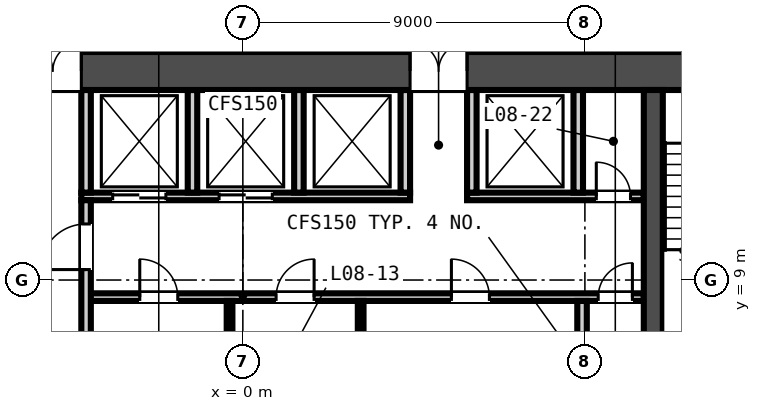
"""IFC4 building model, lengths in metres.
Left out: names, types, materials, properties, quantities, classifications, styles, units other than length and angle.
Written with IfcOpenShell. Run it as: python <this file> out.ifc"""

import sys

from ifc_helpers import new_model, si_unit, direction, frame, frame_2d, origin, place, context, subcontext, project, spatial, rectangle, extrude, element, fill, save


model = new_model("IFC4")
c1 = context("Model", 3, precision=1e-05, world=origin(), true_north=direction((0.0, 1.0)))
c2 = subcontext(c1, "Body", "Model", "MODEL_VIEW")
j1 = project(units=[si_unit("LENGTHUNIT", "METRE"), si_unit("PLANEANGLEUNIT", "RADIAN")], contexts=[c1])
p1 = place(None, origin())
s1 = spatial("IfcSite", under=j1, at=p1, CompositionType="ELEMENT")
p2 = place(p1, origin())
s2 = spatial("IfcBuilding", under=s1, at=p2, CompositionType="ELEMENT")
p3 = place(p2, frame((0.0, 0.0, 43.3)))
s3 = spatial("IfcBuildingStorey", under=s2, at=p3, CompositionType="ELEMENT", Elevation=43.3)
p4 = place(p3, frame((-15.0, 14.5, -0.15), z_axis=(0.0, 0.0, 1.0), x_axis=(1.0, 0.0, 0.0)))
e1 = element("IfcWall", 1, at=p4, inside=s3, PredefinedType="SOLIDWALL", context=c2, shape_type="SweptSolid", body=[
    extrude(rectangle(XDim=30.0, YDim=1.0, at=frame_2d((15.0, 0.0))), origin(), (0.0, 0.0, 1.0), 3.65),
])
p5 = place(p4, frame((9.25, 0.0, 0.15)))
e2 = element("IfcOpeningElement", 2, at=p5, cuts=e1, PredefinedType="OPENING", context=c2, shape_type="SweptSolid", body=[
    extrude(rectangle(XDim=1.5, YDim=2.1, at=frame_2d((0.75, 1.05))), frame((0.0, 0.51, 0.0), z_axis=(0.0, -1.0, 0.0), x_axis=(1.0, 0.0, 0.0)), (0.0, 0.0, 1.0), 1.02),
])
p6 = place(p4, frame((19.4, 0.0, 0.15)))
e3 = element("IfcOpeningElement", 3, at=p6, cuts=e1, PredefinedType="OPENING", context=c2, shape_type="SweptSolid", body=[
    extrude(rectangle(XDim=1.5, YDim=2.1, at=frame_2d((0.75, 1.05))), frame((0.0, 0.51, 0.0), z_axis=(0.0, -1.0, 0.0), x_axis=(1.0, 0.0, 0.0)), (0.0, 0.0, 1.0), 1.02),
])
p7 = place(p4, frame((1.5, 0.0, 0.15)))
e4 = element("IfcOpeningElement", 4, at=p7, cuts=e1, PredefinedType="OPENING", context=c2, shape_type="SweptSolid", body=[
    extrude(rectangle(XDim=1.2, YDim=2.1, at=frame_2d((0.6, 1.05))), frame((0.0, 0.51, 0.0), z_axis=(0.0, -1.0, 0.0), x_axis=(1.0, 0.0, 0.0)), (0.0, 0.0, 1.0), 1.02),
])
p8 = place(p4, frame((27.3, 0.0, 0.15)))
e5 = element("IfcOpeningElement", 5, at=p8, cuts=e1, PredefinedType="OPENING", context=c2, shape_type="SweptSolid", body=[
    extrude(rectangle(XDim=1.2, YDim=2.1, at=frame_2d((0.6, 1.05))), frame((0.0, 0.51, 0.0), z_axis=(0.0, -1.0, 0.0), x_axis=(1.0, 0.0, 0.0)), (0.0, 0.0, 1.0), 1.02),
])
p9 = place(p3, frame((10.8, 1.0, -0.15), z_axis=(0.0, 0.0, 1.0), x_axis=(0.0, 1.0, 0.0)))
e6 = element("IfcWall", 6, at=p9, inside=s3, PredefinedType="SOLIDWALL", context=c2, shape_type="SweptSolid", body=[
    extrude(rectangle(XDim=13.0, YDim=0.5, at=frame_2d((6.5, 0.0))), origin(), (0.0, 0.0, 1.0), 3.65),
])
p10 = place(p3, frame((-4.125, 8.55, 0.0), z_axis=(0.0, 0.0, 1.0), x_axis=(1.0, 0.0, 0.0)))
e7 = element("IfcWall", 7, at=p10, inside=s3, PredefinedType="PARTITIONING", context=c2, shape_type="SweptSolid", body=[
    extrude(rectangle(XDim=14.675, YDim=0.2, at=frame_2d((7.337, 0.0))), origin(), (0.0, 0.0, 1.0), 3.5),
])
p11 = place(p10, frame((1.413, 0.0, 0.0)))
e8 = element("IfcOpeningElement", 8, at=p11, cuts=e7, PredefinedType="OPENING", context=c2, shape_type="SweptSolid", body=[
    extrude(rectangle(XDim=1.0, YDim=2.1, at=frame_2d((0.5, 1.05))), frame((0.0, 0.11, 0.0), z_axis=(0.0, -1.0, 0.0), x_axis=(1.0, 0.0, 0.0)), (0.0, 0.0, 1.0), 0.22),
])
p12 = place(p10, frame((5.0, 0.0, 0.0)))
e9 = element("IfcOpeningElement", 9, at=p12, cuts=e7, PredefinedType="OPENING", context=c2, shape_type="SweptSolid", body=[
    extrude(rectangle(XDim=1.0, YDim=2.1, at=frame_2d((0.5, 1.05))), frame((0.0, 0.11, 0.0), z_axis=(0.0, -1.0, 0.0), x_axis=(1.0, 0.0, 0.0)), (0.0, 0.0, 1.0), 0.22),
])
p13 = place(p10, frame((9.613, 0.0, 0.0)))
e10 = element("IfcOpeningElement", 10, at=p13, cuts=e7, PredefinedType="OPENING", context=c2, shape_type="SweptSolid", body=[
    extrude(rectangle(XDim=1.0, YDim=2.1, at=frame_2d((0.5, 1.05))), frame((0.0, 0.11, 0.0), z_axis=(0.0, -1.0, 0.0), x_axis=(1.0, 0.0, 0.0)), (0.0, 0.0, 1.0), 0.22),
])
p14 = place(p10, frame((13.475, 0.0, 0.0)))
e11 = element("IfcOpeningElement", 11, at=p14, cuts=e7, PredefinedType="OPENING", context=c2, shape_type="SweptSolid", body=[
    extrude(rectangle(XDim=0.9, YDim=2.1, at=frame_2d((0.45, 1.05))), frame((0.0, 0.11, 0.0), z_axis=(0.0, -1.0, 0.0), x_axis=(1.0, 0.0, 0.0)), (0.0, 0.0, 1.0), 0.22),
])
p15 = place(p3, frame((-4.25, 11.2, 0.0), z_axis=(0.0, 0.0, 1.0), x_axis=(1.0, 0.0, 0.0)))
e12 = element("IfcWall", 12, at=p15, inside=s3, PredefinedType="PARTITIONING", context=c2, shape_type="SweptSolid", body=[
    extrude(rectangle(XDim=8.65, YDim=0.2, at=frame_2d((4.325, 0.0))), origin(), (0.0, 0.0, 1.0), 3.5),
])
p16 = place(p15, frame((0.825, 0.0, 0.0)))
e13 = element("IfcOpeningElement", 13, at=p16, cuts=e12, PredefinedType="OPENING", context=c2, shape_type="SweptSolid", body=[
    extrude(rectangle(XDim=1.4, YDim=2.1, at=frame_2d((0.7, 1.05))), frame((0.0, 0.11, 0.0), z_axis=(0.0, -1.0, 0.0), x_axis=(1.0, 0.0, 0.0)), (0.0, 0.0, 1.0), 0.22),
])
p17 = place(p15, frame((3.625, 0.0, 0.0)))
e14 = element("IfcOpeningElement", 14, at=p17, cuts=e12, PredefinedType="OPENING", context=c2, shape_type="SweptSolid", body=[
    extrude(rectangle(XDim=1.4, YDim=2.1, at=frame_2d((0.7, 1.05))), frame((0.0, 0.11, 0.0), z_axis=(0.0, -1.0, 0.0), x_axis=(1.0, 0.0, 0.0)), (0.0, 0.0, 1.0), 0.22),
])
p18 = place(p3, frame((5.9, 11.2, 0.0), z_axis=(0.0, 0.0, 1.0), x_axis=(1.0, 0.0, 0.0)))
e15 = element("IfcWall", 15, at=p18, inside=s3, PredefinedType="PARTITIONING", context=c2, shape_type="SweptSolid", body=[
    extrude(rectangle(XDim=4.65, YDim=0.2, at=frame_2d((2.325, 0.0))), origin(), (0.0, 0.0, 1.0), 3.5),
])
p19 = place(p18, frame((3.4, 0.0, 0.0)))
e16 = element("IfcOpeningElement", 16, at=p19, cuts=e15, PredefinedType="OPENING", context=c2, shape_type="SweptSolid", body=[
    extrude(rectangle(XDim=0.9, YDim=2.1, at=frame_2d((0.45, 1.05))), frame((0.0, 0.11, 0.0), z_axis=(0.0, -1.0, 0.0), x_axis=(1.0, 0.0, 0.0)), (0.0, 0.0, 1.0), 0.22),
])
p20 = place(p3, frame((-4.125, 6.15, 0.0), z_axis=(0.0, 0.0, 1.0), x_axis=(0.0, 1.0, 0.0)))
e17 = element("IfcWall", 17, at=p20, inside=s3, PredefinedType="PARTITIONING", context=c2, shape_type="SweptSolid", body=[
    extrude(rectangle(XDim=4.95, YDim=0.25, at=frame_2d((2.475, 0.0))), origin(), (0.0, 0.0, 1.0), 3.5),
])
p21 = place(p20, frame((3.125, 0.0, 0.0)))
e18 = element("IfcOpeningElement", 18, at=p21, cuts=e17, PredefinedType="OPENING", context=c2, shape_type="SweptSolid", body=[
    extrude(rectangle(XDim=1.2, YDim=2.1, at=frame_2d((0.6, 1.05))), frame((0.0, 0.135, 0.0), z_axis=(0.0, -1.0, 0.0), x_axis=(1.0, 0.0, 0.0)), (0.0, 0.0, 1.0), 0.27),
])
for number, where, z_axis, x_axis in (
    (19, (-0.35, 6.15, 0.0), (0.0, 0.0, 1.0), (0.0, 1.0, 0.0)),
    (20, (3.1, 6.15, 0.0), (0.0, 0.0, 1.0), (0.0, 1.0, 0.0)),
):
    element("IfcWall", number, at=place(p3, frame(where, z_axis=z_axis, x_axis=x_axis)), inside=s3, PredefinedType="PARTITIONING", context=c2, shape_type="SweptSolid", body=[
        extrude(rectangle(XDim=2.3, YDim=0.15, at=frame_2d((1.15, 0.0))), origin(), (0.0, 0.0, 1.0), 3.5),
    ])
p22 = place(p3, frame((8.925, 6.15, 0.0), z_axis=(0.0, 0.0, 1.0), x_axis=(0.0, 1.0, 0.0)))
e21 = element("IfcWall", 21, at=p22, inside=s3, PredefinedType="PARTITIONING", context=c2, shape_type="SweptSolid", body=[
    extrude(rectangle(XDim=2.3, YDim=0.25, at=frame_2d((1.15, 0.0))), origin(), (0.0, 0.0, 1.0), 3.5),
])
for number, where, z_axis, x_axis in (
    (22, (-4.125, 11.3, 0.0), (0.0, 0.0, 1.0), (0.0, 1.0, 0.0)),
    (23, (-1.325, 11.3, 0.0), (0.0, 0.0, 1.0), (0.0, 1.0, 0.0)),
    (24, (1.475, 11.3, 0.0), (0.0, 0.0, 1.0), (0.0, 1.0, 0.0)),
    (25, (4.275, 11.3, 0.0), (0.0, 0.0, 1.0), (0.0, 1.0, 0.0)),
    (26, (6.025, 11.3, 0.0), (0.0, 0.0, 1.0), (0.0, 1.0, 0.0)),
    (27, (8.825, 11.3, 0.0), (0.0, 0.0, 1.0), (0.0, 1.0, 0.0)),
):
    element("IfcWall", number, at=place(p3, frame(where, z_axis=z_axis, x_axis=x_axis)), inside=s3, PredefinedType="PARTITIONING", context=c2, shape_type="SweptSolid", body=[
        extrude(rectangle(XDim=2.7, YDim=0.25, at=frame_2d((1.35, 0.0))), origin(), (0.0, 0.0, 1.0), 3.5),
    ])
p23 = place(p21, origin())
e28 = element("IfcDoor", 28, at=p23, inside=s3, OperationType="SINGLE_SWING_LEFT", PredefinedType="DOOR", context=c2, shape_type="SweptSolid", body=[
    extrude(rectangle(XDim=1.2, YDim=2.1, at=frame_2d((0.6, 1.05))), frame((0.0, 0.025, 0.0), z_axis=(0.0, -1.0, 0.0), x_axis=(1.0, 0.0, 0.0)), (0.0, 0.0, 1.0), 0.05),
])
fill(e18, e28)
p24 = place(p11, origin())
e29 = element("IfcDoor", 29, at=p24, inside=s3, OperationType="SINGLE_SWING_LEFT", PredefinedType="DOOR", context=c2, shape_type="SweptSolid", body=[
    extrude(rectangle(XDim=1.0, YDim=2.1, at=frame_2d((0.5, 1.05))), frame((0.0, 0.025, 0.0), z_axis=(0.0, -1.0, 0.0), x_axis=(1.0, 0.0, 0.0)), (0.0, 0.0, 1.0), 0.05),
])
fill(e8, e29)
p25 = place(p12, origin())
e30 = element("IfcDoor", 30, at=p25, inside=s3, OperationType="SINGLE_SWING_RIGHT", PredefinedType="DOOR", context=c2, shape_type="SweptSolid", body=[
    extrude(rectangle(XDim=1.0, YDim=2.1, at=frame_2d((0.5, 1.05))), frame((0.0, 0.025, 0.0), z_axis=(0.0, -1.0, 0.0), x_axis=(1.0, 0.0, 0.0)), (0.0, 0.0, 1.0), 0.05),
])
fill(e9, e30)
p26 = place(p13, origin())
e31 = element("IfcDoor", 31, at=p26, inside=s3, OperationType="SINGLE_SWING_LEFT", PredefinedType="DOOR", context=c2, shape_type="SweptSolid", body=[
    extrude(rectangle(XDim=1.0, YDim=2.1, at=frame_2d((0.5, 1.05))), frame((0.0, 0.025, 0.0), z_axis=(0.0, -1.0, 0.0), x_axis=(1.0, 0.0, 0.0)), (0.0, 0.0, 1.0), 0.05),
])
fill(e10, e31)
p27 = place(p14, origin())
e32 = element("IfcDoor", 32, at=p27, inside=s3, OperationType="SINGLE_SWING_RIGHT", PredefinedType="DOOR", context=c2, shape_type="SweptSolid", body=[
    extrude(rectangle(XDim=0.9, YDim=2.1, at=frame_2d((0.45, 1.05))), frame((0.0, 0.025, 0.0), z_axis=(0.0, -1.0, 0.0), x_axis=(1.0, 0.0, 0.0)), (0.0, 0.0, 1.0), 0.05),
])
fill(e11, e32)
p28 = place(p16, origin())
e33 = element("IfcDoor", 33, at=p28, inside=s3, OperationType="DOUBLE_DOOR_SLIDING", PredefinedType="DOOR", context=c2, shape_type="SweptSolid", body=[
    extrude(rectangle(XDim=1.4, YDim=2.1, at=frame_2d((0.7, 1.05))), frame((0.0, 0.025, 0.0), z_axis=(0.0, -1.0, 0.0), x_axis=(1.0, 0.0, 0.0)), (0.0, 0.0, 1.0), 0.05),
])
fill(e13, e33)
p29 = place(p17, origin())
e34 = element("IfcDoor", 34, at=p29, inside=s3, OperationType="DOUBLE_DOOR_SLIDING", PredefinedType="DOOR", context=c2, shape_type="SweptSolid", body=[
    extrude(rectangle(XDim=1.4, YDim=2.1, at=frame_2d((0.7, 1.05))), frame((0.0, 0.025, 0.0), z_axis=(0.0, -1.0, 0.0), x_axis=(1.0, 0.0, 0.0)), (0.0, 0.0, 1.0), 0.05),
])
fill(e14, e34)
p30 = place(p19, origin())
e35 = element("IfcDoor", 35, at=p30, inside=s3, OperationType="SINGLE_SWING_LEFT", PredefinedType="DOOR", context=c2, shape_type="SweptSolid", body=[
    extrude(rectangle(XDim=0.9, YDim=2.1, at=frame_2d((0.45, 1.05))), frame((0.0, 0.025, 0.0), z_axis=(0.0, -1.0, 0.0), x_axis=(1.0, 0.0, 0.0)), (0.0, 0.0, 1.0), 0.05),
])
fill(e16, e35)
p31 = place(p5, origin())
e36 = element("IfcDoor", 36, at=p31, inside=s3, OperationType="DOUBLE_DOOR_SINGLE_SWING", PredefinedType="DOOR", context=c2, shape_type="SweptSolid", body=[
    extrude(rectangle(XDim=1.5, YDim=2.1, at=frame_2d((0.75, 1.05))), frame((0.0, 0.025, 0.0), z_axis=(0.0, -1.0, 0.0), x_axis=(1.0, 0.0, 0.0)), (0.0, 0.0, 1.0), 0.05),
])
fill(e2, e36)
p32 = place(p6, origin())
e37 = element("IfcDoor", 37, at=p32, inside=s3, OperationType="DOUBLE_DOOR_SINGLE_SWING", PredefinedType="DOOR", context=c2, shape_type="SweptSolid", body=[
    extrude(rectangle(XDim=1.5, YDim=2.1, at=frame_2d((0.75, 1.05))), frame((0.0, 0.025, 0.0), z_axis=(0.0, -1.0, 0.0), x_axis=(1.0, 0.0, 0.0)), (0.0, 0.0, 1.0), 0.05),
])
fill(e3, e37)
save(model, sys.argv[1])
